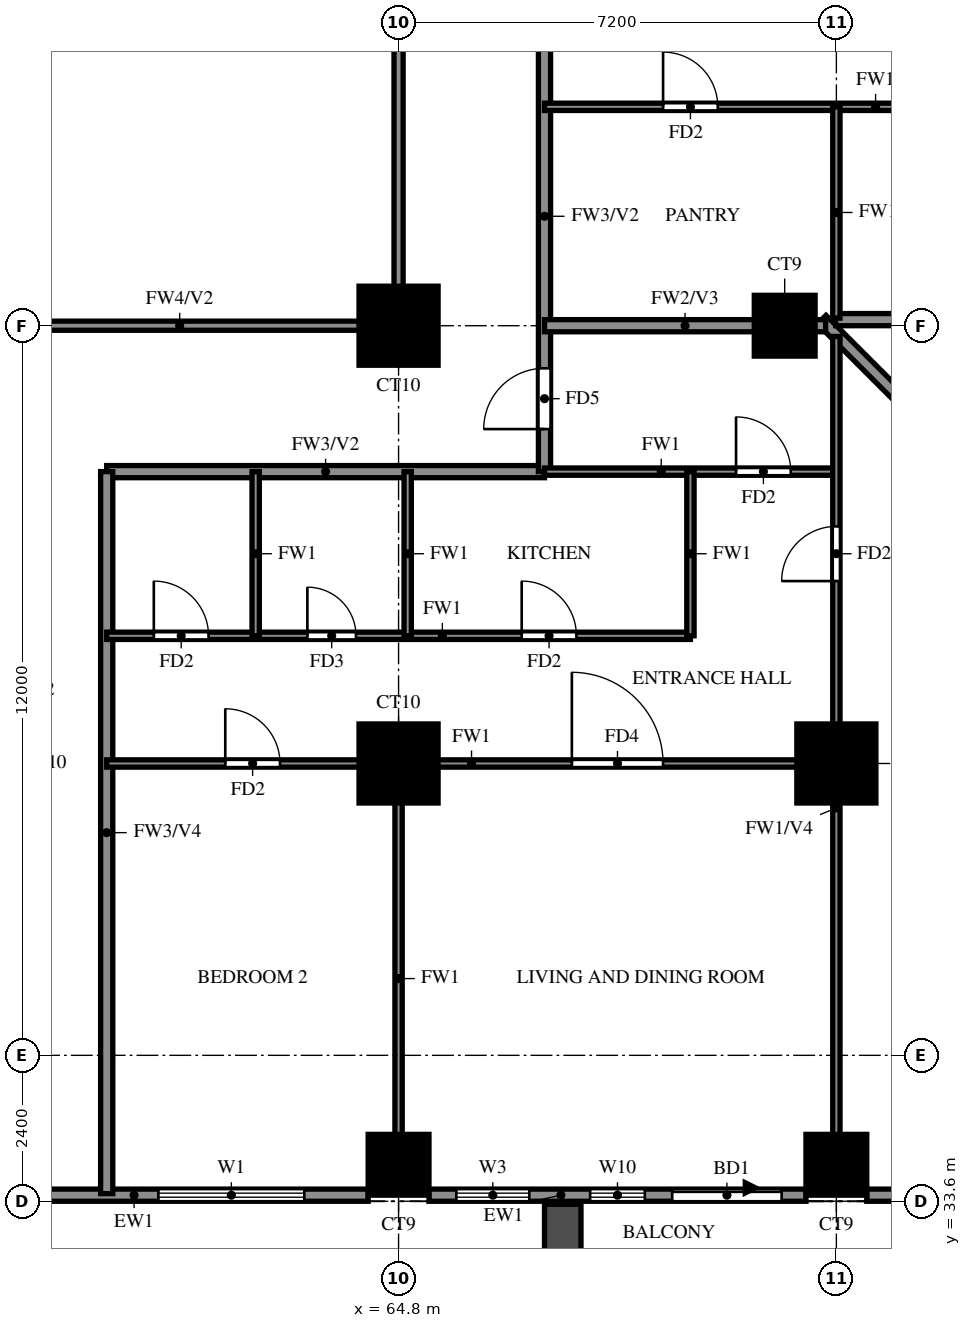
"""IFC4 building model, lengths in metres.
Left out: names, types, materials, properties, quantities, classifications, styles, units other than length and angle.
Written with IfcOpenShell. Run it as: python <this file> out.ifc"""

import sys

from ifc_helpers import new_model, si_unit, direction, frame, frame_2d, origin, origin_2d, place, context, subcontext, project, spatial, rectangle, extrude, source, transform, mapped, element, fill, save


model = new_model("IFC4")
c1 = context("Model", 3, precision=1e-05, world=origin(), true_north=direction((0.0, 1.0)))
c2 = subcontext(c1, "Body", "Model", "MODEL_VIEW")
j1 = project(units=[si_unit("LENGTHUNIT", "METRE"), si_unit("PLANEANGLEUNIT", "RADIAN")], contexts=[c1])
p1 = place(None, origin())
s1 = spatial("IfcSite", under=j1, at=p1, CompositionType="ELEMENT")
p2 = place(p1, origin())
s2 = spatial("IfcBuilding", under=s1, at=p2, CompositionType="ELEMENT")
p3 = place(p2, frame((0.0, 0.0, 90.0)))
s3 = spatial("IfcBuildingStorey", under=s2, at=p3, CompositionType="ELEMENT", Elevation=90.0)
m1 = source(origin(), c2, "Body", "SweptSolid", [
    extrude(rectangle(XDim=1.0, YDim=1.0, at=origin_2d()), origin(), (0.0, 0.0, 1.0), 3.18),
])
for number, where, z_axis, x_axis in (
    (1, (64.8, 34.2, 0.0), (0.0, 0.0, 1.0), (1.0, 0.0, 0.0)),
    (2, (72.0, 34.2, 0.0), (0.0, 0.0, 1.0), (1.0, 0.0, 0.0)),
):
    element("IfcColumn", number, at=place(p3, frame(where, z_axis=z_axis, x_axis=x_axis)), inside=s3, PredefinedType="COLUMN", context=c2, shape_type="MappedRepresentation", body=[
        mapped(m1, transform((0.0, 0.0, 0.0))),
    ])
m2 = source(origin(), c2, "Body", "SweptSolid", [
    extrude(rectangle(XDim=1.3, YDim=1.3, at=origin_2d()), origin(), (0.0, 0.0, 1.0), 3.18),
])
for number, where, z_axis, x_axis in (
    (3, (64.8, 40.8, 0.0), (0.0, 0.0, 1.0), (1.0, 0.0, 0.0)),
    (4, (72.0, 40.8, 0.0), (0.0, 0.0, 1.0), (1.0, 0.0, 0.0)),
    (5, (64.8, 48.0, 0.0), (0.0, 0.0, 1.0), (1.0, 0.0, 0.0)),
):
    element("IfcColumn", number, at=place(p3, frame(where, z_axis=z_axis, x_axis=x_axis)), inside=s3, PredefinedType="COLUMN", context=c2, shape_type="MappedRepresentation", body=[
        mapped(m2, transform((0.0, 0.0, 0.0))),
    ])
p4 = place(p3, frame((71.15, 48.0, 0.0), z_axis=(0.0, 0.0, 1.0), x_axis=(1.0, 0.0, 0.0)))
e6 = element("IfcColumn", 6, at=p4, inside=s3, PredefinedType="COLUMN", context=c2, shape_type="MappedRepresentation", body=[
    mapped(m1, transform((0.0, 0.0, 0.0))),
])
p5 = place(p3, frame((85.996, 33.863, 0.0), z_axis=(0.0, 0.0, 1.0), x_axis=(-0.707100718496, 0.707112843825, 0.0)))
e7 = element("IfcWall", 7, at=p5, inside=s3, PredefinedType="SOLIDWALL", context=c2, shape_type="SweptSolid", body=[
    extrude(rectangle(XDim=20.135, YDim=0.2, at=frame_2d((10.067, 0.0))), origin(), (0.0, 0.0, 1.0), 3.18),
])
p6 = place(p3, frame((71.989, 48.1, 0.0), z_axis=(0.0, 0.0, 1.0), x_axis=(1.0, 0.0, 0.0)))
e8 = element("IfcWall", 8, at=p6, inside=s3, PredefinedType="SOLIDWALL", context=c2, shape_type="SweptSolid", body=[
    extrude(rectangle(XDim=6.562, YDim=0.2, at=frame_2d((3.281, 0.0))), origin(), (0.0, 0.0, 1.0), 3.18),
])
p7 = place(p6, frame((2.206, 0.0, 1.5)))
e9 = element("IfcOpeningElement", 9, at=p7, cuts=e8, PredefinedType="OPENING", context=c2, shape_type="SweptSolid", body=[
    extrude(rectangle(XDim=0.9, YDim=0.9, at=frame_2d((0.45, 0.45))), frame((0.0, 0.11, 0.0), z_axis=(0.0, -1.0, 0.0), x_axis=(1.0, 0.0, 0.0)), (0.0, 0.0, 1.0), 0.22),
])
p8 = place(p3, frame((58.8, 33.7, 0.0), z_axis=(0.0, 0.0, 1.0), x_axis=(1.0, 0.0, 0.0)))
e10 = element("IfcWall", 10, at=p8, inside=s3, PredefinedType="SOLIDWALL", context=c2, shape_type="SweptSolid", body=[
    extrude(rectangle(XDim=5.5, YDim=0.2, at=frame_2d((2.75, 0.0))), origin(), (0.0, 0.0, 1.0), 3.18),
])
p9 = place(p8, frame((2.05, 0.0, 0.6)))
e11 = element("IfcOpeningElement", 11, at=p9, cuts=e10, PredefinedType="OPENING", context=c2, shape_type="SweptSolid", body=[
    extrude(rectangle(XDim=2.4, YDim=2.4, at=frame_2d((1.2, 1.2))), frame((0.0, 0.11, 0.0), z_axis=(0.0, -1.0, 0.0), x_axis=(1.0, 0.0, 0.0)), (0.0, 0.0, 1.0), 0.22),
])
p10 = place(p3, frame((65.3, 33.7, 0.0), z_axis=(0.0, 0.0, 1.0), x_axis=(1.0, 0.0, 0.0)))
e12 = element("IfcWall", 12, at=p10, inside=s3, PredefinedType="SOLIDWALL", context=c2, shape_type="SweptSolid", body=[
    extrude(rectangle(XDim=6.2, YDim=0.2, at=frame_2d((3.1, 0.0))), origin(), (0.0, 0.0, 1.0), 3.18),
])
p11 = place(p10, frame((4.0, 0.0, 0.0)))
e13 = element("IfcOpeningElement", 13, at=p11, cuts=e12, PredefinedType="OPENING", context=c2, shape_type="SweptSolid", body=[
    extrude(rectangle(XDim=1.8, YDim=2.4, at=frame_2d((0.9, 1.2))), frame((0.0, 0.11, 0.0), z_axis=(0.0, -1.0, 0.0), x_axis=(1.0, 0.0, 0.0)), (0.0, 0.0, 1.0), 0.22),
])
p12 = place(p10, frame((0.45, 0.0, 0.6)))
e14 = element("IfcOpeningElement", 14, at=p12, cuts=e12, PredefinedType="OPENING", context=c2, shape_type="SweptSolid", body=[
    extrude(rectangle(XDim=1.2, YDim=2.4, at=frame_2d((0.6, 1.2))), frame((0.0, 0.11, 0.0), z_axis=(0.0, -1.0, 0.0), x_axis=(1.0, 0.0, 0.0)), (0.0, 0.0, 1.0), 0.22),
])
p13 = place(p10, frame((2.65, 0.0, 0.6)))
e15 = element("IfcOpeningElement", 15, at=p13, cuts=e12, PredefinedType="OPENING", context=c2, shape_type="SweptSolid", body=[
    extrude(rectangle(XDim=0.9, YDim=2.4, at=frame_2d((0.45, 1.2))), frame((0.0, 0.11, 0.0), z_axis=(0.0, -1.0, 0.0), x_axis=(1.0, 0.0, 0.0)), (0.0, 0.0, 1.0), 0.22),
])
p14 = place(p3, frame((72.5, 33.7, 0.0), z_axis=(0.0, 0.0, 1.0), x_axis=(1.0, 0.0, 0.0)))
e16 = element("IfcWall", 16, at=p14, inside=s3, PredefinedType="SOLIDWALL", context=c2, shape_type="SweptSolid", body=[
    extrude(rectangle(XDim=13.659, YDim=0.2, at=frame_2d((6.829, 0.0))), origin(), (0.0, 0.0, 1.0), 3.18),
])
p15 = place(p14, frame((3.1, 0.0, 0.6)))
e17 = element("IfcOpeningElement", 17, at=p15, cuts=e16, PredefinedType="OPENING", context=c2, shape_type="SweptSolid", body=[
    extrude(rectangle(XDim=2.4, YDim=2.4, at=frame_2d((1.2, 1.2))), frame((0.0, 0.11, 0.0), z_axis=(0.0, -1.0, 0.0), x_axis=(1.0, 0.0, 0.0)), (0.0, 0.0, 1.0), 0.22),
])
p16 = place(p14, frame((7.386, 0.0, 0.6)))
e18 = element("IfcOpeningElement", 18, at=p16, cuts=e16, PredefinedType="OPENING", context=c2, shape_type="SweptSolid", body=[
    extrude(rectangle(XDim=2.4, YDim=2.4, at=frame_2d((1.2, 1.2))), frame((0.0, 0.11, 0.0), z_axis=(0.0, -1.0, 0.0), x_axis=(1.0, 0.0, 0.0)), (0.0, 0.0, 1.0), 0.22),
])
p17 = place(p14, frame((10.372, 0.0, 0.6)))
e19 = element("IfcOpeningElement", 19, at=p17, cuts=e16, PredefinedType="OPENING", context=c2, shape_type="SweptSolid", body=[
    extrude(rectangle(XDim=2.4, YDim=2.4, at=frame_2d((1.2, 1.2))), frame((0.0, 0.11, 0.0), z_axis=(0.0, -1.0, 0.0), x_axis=(1.0, 0.0, 0.0)), (0.0, 0.0, 1.0), 0.22),
])
p18 = place(p3, frame((67.5, 33.55, 0.0), z_axis=(0.0, 0.0, 1.0), x_axis=(0.0, -1.0, 0.0)))
e20 = element("IfcWall", 20, at=p18, inside=s3, PredefinedType="SOLIDWALL", context=c2, shape_type="SweptSolid", body=[
    extrude(rectangle(XDim=2.65, YDim=0.6, at=frame_2d((1.325, 0.0))), origin(), (0.0, 0.0, 1.0), 2.85),
])
p19 = place(p3, frame((60.0, 45.6, 0.0), z_axis=(0.0, 0.0, 1.0), x_axis=(1.0, 0.0, 0.0)))
e21 = element("IfcWall", 21, at=p19, inside=s3, PredefinedType="SOLIDWALL", context=c2, shape_type="SweptSolid", body=[
    extrude(rectangle(XDim=7.2, YDim=0.2, at=frame_2d((3.6, 0.0))), origin(), (0.0, 0.0, 1.0), 3.18),
])
p20 = place(p3, frame((60.0, 33.725, 0.0), z_axis=(0.0, 0.0, 1.0), x_axis=(0.0, 1.0, 0.0)))
e22 = element("IfcWall", 22, at=p20, inside=s3, PredefinedType="SOLIDWALL", context=c2, shape_type="SweptSolid", body=[
    extrude(rectangle(XDim=11.875, YDim=0.2, at=frame_2d((5.938, 0.0))), origin(), (0.0, 0.0, 1.0), 2.28),
])
p21 = place(p3, frame((67.2, 45.6, 0.0), z_axis=(0.0, 0.0, 1.0), x_axis=(0.0, 1.0, 0.0)))
e23 = element("IfcWall", 23, at=p21, inside=s3, PredefinedType="SOLIDWALL", context=c2, shape_type="SweptSolid", body=[
    extrude(rectangle(XDim=8.4, YDim=0.2, at=frame_2d((4.2, 0.0))), origin(), (0.0, 0.0, 1.0), 3.18),
])
p22 = place(p21, frame((0.7, 0.0, 0.0)))
e24 = element("IfcOpeningElement", 24, at=p22, cuts=e23, PredefinedType="OPENING", context=c2, shape_type="SweptSolid", body=[
    extrude(rectangle(XDim=1.0, YDim=2.1, at=frame_2d((0.5, 1.05))), frame((0.0, 0.11, 0.0), z_axis=(0.0, -1.0, 0.0), x_axis=(1.0, 0.0, 0.0)), (0.0, 0.0, 1.0), 0.22),
])
p23 = place(p3, frame((67.2, 48.0, 0.0), z_axis=(0.0, 0.0, 1.0), x_axis=(1.0, 0.0, 0.0)))
e25 = element("IfcWall", 25, at=p23, inside=s3, PredefinedType="SOLIDWALL", context=c2, shape_type="SweptSolid", body=[
    extrude(rectangle(XDim=4.623, YDim=0.2, at=frame_2d((2.312, 0.0))), origin(), (0.0, 0.0, 1.0), 3.18),
])
p24 = place(p3, frame((60.0, 40.8, 0.0), z_axis=(0.0, 0.0, 1.0), x_axis=(1.0, 0.0, 0.0)))
e26 = element("IfcWall", 26, at=p24, inside=s3, PredefinedType="PARTITIONING", context=c2, shape_type="SweptSolid", body=[
    extrude(rectangle(XDim=12.0, YDim=0.12, at=frame_2d((6.0, 0.0))), origin(), (0.0, 0.0, 1.0), 3.18),
])
p25 = place(p24, frame((7.65, 0.0, 0.0)))
e27 = element("IfcOpeningElement", 27, at=p25, cuts=e26, PredefinedType="OPENING", context=c2, shape_type="SweptSolid", body=[
    extrude(rectangle(XDim=1.5, YDim=2.1, at=frame_2d((0.75, 1.05))), frame((0.0, 0.07, 0.0), z_axis=(0.0, -1.0, 0.0), x_axis=(1.0, 0.0, 0.0)), (0.0, 0.0, 1.0), 0.14),
])
p26 = place(p24, frame((1.95, 0.0, 0.0)))
e28 = element("IfcOpeningElement", 28, at=p26, cuts=e26, PredefinedType="OPENING", context=c2, shape_type="SweptSolid", body=[
    extrude(rectangle(XDim=0.9, YDim=2.1, at=frame_2d((0.45, 1.05))), frame((0.0, 0.07, 0.0), z_axis=(0.0, -1.0, 0.0), x_axis=(1.0, 0.0, 0.0)), (0.0, 0.0, 1.0), 0.14),
])
p27 = place(p3, frame((60.0, 42.9, 0.0), z_axis=(0.0, 0.0, 1.0), x_axis=(1.0, 0.0, 0.0)))
e29 = element("IfcWall", 29, at=p27, inside=s3, PredefinedType="PARTITIONING", context=c2, shape_type="SweptSolid", body=[
    extrude(rectangle(XDim=9.6, YDim=0.12, at=frame_2d((4.8, 0.0))), origin(), (0.0, 0.0, 1.0), 3.18),
])
p28 = place(p27, frame((6.825, 0.0, 0.0)))
e30 = element("IfcOpeningElement", 30, at=p28, cuts=e29, PredefinedType="OPENING", context=c2, shape_type="SweptSolid", body=[
    extrude(rectangle(XDim=0.9, YDim=2.1, at=frame_2d((0.45, 1.05))), frame((0.0, 0.07, 0.0), z_axis=(0.0, -1.0, 0.0), x_axis=(1.0, 0.0, 0.0)), (0.0, 0.0, 1.0), 0.14),
])
p29 = place(p27, frame((3.3, 0.0, 0.0)))
e31 = element("IfcOpeningElement", 31, at=p29, cuts=e29, PredefinedType="OPENING", context=c2, shape_type="SweptSolid", body=[
    extrude(rectangle(XDim=0.8, YDim=2.1, at=frame_2d((0.4, 1.05))), frame((0.0, 0.07, 0.0), z_axis=(0.0, -1.0, 0.0), x_axis=(1.0, 0.0, 0.0)), (0.0, 0.0, 1.0), 0.14),
])
p30 = place(p27, frame((0.775, 0.0, 0.0)))
e32 = element("IfcOpeningElement", 32, at=p30, cuts=e29, PredefinedType="OPENING", context=c2, shape_type="SweptSolid", body=[
    extrude(rectangle(XDim=0.9, YDim=2.1, at=frame_2d((0.45, 1.05))), frame((0.0, 0.07, 0.0), z_axis=(0.0, -1.0, 0.0), x_axis=(1.0, 0.0, 0.0)), (0.0, 0.0, 1.0), 0.14),
])
p31 = place(p3, frame((67.2, 45.6, 0.0), z_axis=(0.0, 0.0, 1.0), x_axis=(1.0, 0.0, 0.0)))
e33 = element("IfcWall", 33, at=p31, inside=s3, PredefinedType="PARTITIONING", context=c2, shape_type="SweptSolid", body=[
    extrude(rectangle(XDim=4.8, YDim=0.12, at=frame_2d((2.4, 0.0))), origin(), (0.0, 0.0, 1.0), 3.18),
])
p32 = place(p31, frame((3.15, 0.0, 0.0)))
e34 = element("IfcOpeningElement", 34, at=p32, cuts=e33, PredefinedType="OPENING", context=c2, shape_type="SweptSolid", body=[
    extrude(rectangle(XDim=0.9, YDim=2.1, at=frame_2d((0.45, 1.05))), frame((0.0, 0.07, 0.0), z_axis=(0.0, -1.0, 0.0), x_axis=(1.0, 0.0, 0.0)), (0.0, 0.0, 1.0), 0.14),
])
p33 = place(p3, frame((67.2, 51.6, 0.0), z_axis=(0.0, 0.0, 1.0), x_axis=(1.0, 0.0, 0.0)))
e35 = element("IfcWall", 35, at=p33, inside=s3, PredefinedType="PARTITIONING", context=c2, shape_type="SweptSolid", body=[
    extrude(rectangle(XDim=9.9, YDim=0.12, at=frame_2d((4.95, 0.0))), origin(), (0.0, 0.0, 1.0), 3.18),
])
p34 = place(p33, frame((6.95, 0.0, 0.0)))
e36 = element("IfcOpeningElement", 36, at=p34, cuts=e35, PredefinedType="OPENING", context=c2, shape_type="SweptSolid", body=[
    extrude(rectangle(XDim=0.8, YDim=2.1, at=frame_2d((0.4, 1.05))), frame((0.0, 0.07, 0.0), z_axis=(0.0, -1.0, 0.0), x_axis=(1.0, 0.0, 0.0)), (0.0, 0.0, 1.0), 0.14),
])
p35 = place(p33, frame((1.95, 0.0, 0.0)))
e37 = element("IfcOpeningElement", 37, at=p35, cuts=e35, PredefinedType="OPENING", context=c2, shape_type="SweptSolid", body=[
    extrude(rectangle(XDim=0.9, YDim=2.1, at=frame_2d((0.45, 1.05))), frame((0.0, 0.07, 0.0), z_axis=(0.0, -1.0, 0.0), x_axis=(1.0, 0.0, 0.0)), (0.0, 0.0, 1.0), 0.14),
])
p36 = place(p3, frame((62.45, 42.9, 0.0), z_axis=(0.0, 0.0, 1.0), x_axis=(0.0, 1.0, 0.0)))
e38 = element("IfcWall", 38, at=p36, inside=s3, PredefinedType="PARTITIONING", context=c2, shape_type="SweptSolid", body=[
    extrude(rectangle(XDim=2.7, YDim=0.12, at=frame_2d((1.35, 0.0))), origin(), (0.0, 0.0, 1.0), 3.18),
])
p37 = place(p3, frame((64.8, 33.725, 0.0), z_axis=(0.0, 0.0, 1.0), x_axis=(0.0, 1.0, 0.0)))
e39 = element("IfcWall", 39, at=p37, inside=s3, PredefinedType="PARTITIONING", context=c2, shape_type="SweptSolid", body=[
    extrude(rectangle(XDim=7.075, YDim=0.12, at=frame_2d((3.538, 0.0))), origin(), (0.0, 0.0, 1.0), 3.18),
])
for number, where, z_axis, x_axis in (
    (40, (64.95, 42.9, 0.0), (0.0, 0.0, 1.0), (0.0, 1.0, 0.0)),
    (41, (69.6, 42.9, 0.0), (0.0, 0.0, 1.0), (0.0, 1.0, 0.0)),
):
    element("IfcWall", number, at=place(p3, frame(where, z_axis=z_axis, x_axis=x_axis)), inside=s3, PredefinedType="PARTITIONING", context=c2, shape_type="SweptSolid", body=[
        extrude(rectangle(XDim=2.7, YDim=0.12, at=frame_2d((1.35, 0.0))), origin(), (0.0, 0.0, 1.0), 3.18),
    ])
p38 = place(p3, frame((72.0, 33.725, 0.0), z_axis=(0.0, 0.0, 1.0), x_axis=(0.0, 1.0, 0.0)))
e42 = element("IfcWall", 42, at=p38, inside=s3, PredefinedType="PARTITIONING", context=c2, shape_type="SweptSolid", body=[
    extrude(rectangle(XDim=14.098, YDim=0.12, at=frame_2d((7.049, 0.0))), origin(), (0.0, 0.0, 1.0), 2.28),
])
p39 = place(p38, frame((10.075, 0.0, 0.0)))
e43 = element("IfcOpeningElement", 43, at=p39, cuts=e42, PredefinedType="OPENING", context=c2, shape_type="SweptSolid", body=[
    extrude(rectangle(XDim=0.9, YDim=2.1, at=frame_2d((0.45, 1.05))), frame((0.0, 0.07, 0.0), z_axis=(0.0, -1.0, 0.0), x_axis=(1.0, 0.0, 0.0)), (0.0, 0.0, 1.0), 0.14),
])
p40 = place(p3, frame((72.0, 48.125, 0.0), z_axis=(0.0, 0.0, 1.0), x_axis=(0.0, 1.0, 0.0)))
e44 = element("IfcWall", 44, at=p40, inside=s3, PredefinedType="PARTITIONING", context=c2, shape_type="SweptSolid", body=[
    extrude(rectangle(XDim=3.475, YDim=0.12, at=frame_2d((1.738, 0.0))), origin(), (0.0, 0.0, 1.0), 3.18),
])
p41 = place(p3, frame((57.6, 48.0, 0.0), z_axis=(0.0, 0.0, 1.0), x_axis=(1.0, 0.0, 0.0)))
e45 = element("IfcWall", 45, at=p41, inside=s3, PredefinedType="SOLIDWALL", context=c2, shape_type="SweptSolid", body=[
    extrude(rectangle(XDim=7.2, YDim=0.15, at=frame_2d((3.6, 0.0))), origin(), (0.0, 0.0, 1.0), 2.28),
])
p42 = place(p3, frame((64.8, 48.0, 0.0), z_axis=(0.0, 0.0, 1.0), x_axis=(0.0, 1.0, 0.0)))
e46 = element("IfcWall", 46, at=p42, inside=s3, PredefinedType="SOLIDWALL", context=c2, shape_type="SweptSolid", body=[
    extrude(rectangle(XDim=14.4, YDim=0.15, at=frame_2d((7.2, 0.0))), origin(), (0.0, 0.0, 1.0), 2.28),
])
p43 = place(p9, origin())
e47 = element("IfcWindow", 47, at=p43, inside=s3, PartitioningType="DOUBLE_PANEL_VERTICAL", PredefinedType="WINDOW", context=c2, shape_type="SweptSolid", body=[
    extrude(rectangle(XDim=2.4, YDim=2.4, at=frame_2d((1.2, 1.2))), frame((0.0, 0.03, 0.0), z_axis=(0.0, -1.0, 0.0), x_axis=(1.0, 0.0, 0.0)), (0.0, 0.0, 1.0), 0.06),
])
fill(e11, e47)
p44 = place(p11, origin())
e48 = element("IfcDoor", 48, at=p44, inside=s3, OperationType="DOUBLE_DOOR_SLIDING", PredefinedType="DOOR", context=c2, shape_type="SweptSolid", body=[
    extrude(rectangle(XDim=1.8, YDim=2.4, at=frame_2d((0.9, 1.2))), frame((0.0, 0.025, 0.0), z_axis=(0.0, -1.0, 0.0), x_axis=(1.0, 0.0, 0.0)), (0.0, 0.0, 1.0), 0.05),
])
fill(e13, e48)
p45 = place(p12, origin())
e49 = element("IfcWindow", 49, at=p45, inside=s3, PartitioningType="SINGLE_PANEL", PredefinedType="WINDOW", context=c2, shape_type="SweptSolid", body=[
    extrude(rectangle(XDim=1.2, YDim=2.4, at=frame_2d((0.6, 1.2))), frame((0.0, 0.03, 0.0), z_axis=(0.0, -1.0, 0.0), x_axis=(1.0, 0.0, 0.0)), (0.0, 0.0, 1.0), 0.06),
])
fill(e14, e49)
p46 = place(p13, origin())
e50 = element("IfcWindow", 50, at=p46, inside=s3, PartitioningType="SINGLE_PANEL", PredefinedType="WINDOW", context=c2, shape_type="SweptSolid", body=[
    extrude(rectangle(XDim=0.9, YDim=2.4, at=frame_2d((0.45, 1.2))), frame((0.0, 0.03, 0.0), z_axis=(0.0, -1.0, 0.0), x_axis=(1.0, 0.0, 0.0)), (0.0, 0.0, 1.0), 0.06),
])
fill(e15, e50)
p47 = place(p35, origin())
e51 = element("IfcDoor", 51, at=p47, inside=s3, OperationType="SINGLE_SWING_RIGHT", PredefinedType="DOOR", context=c2, shape_type="SweptSolid", body=[
    extrude(rectangle(XDim=0.9, YDim=2.1, at=frame_2d((0.45, 1.05))), frame((0.0, 0.025, 0.0), z_axis=(0.0, -1.0, 0.0), x_axis=(1.0, 0.0, 0.0)), (0.0, 0.0, 1.0), 0.05),
])
fill(e37, e51)
p48 = place(p32, origin())
e52 = element("IfcDoor", 52, at=p48, inside=s3, OperationType="SINGLE_SWING_LEFT", PredefinedType="DOOR", context=c2, shape_type="SweptSolid", body=[
    extrude(rectangle(XDim=0.9, YDim=2.1, at=frame_2d((0.45, 1.05))), frame((0.0, 0.025, 0.0), z_axis=(0.0, -1.0, 0.0), x_axis=(1.0, 0.0, 0.0)), (0.0, 0.0, 1.0), 0.05),
])
fill(e34, e52)
p49 = place(p22, origin())
e53 = element("IfcDoor", 53, at=p49, inside=s3, OperationType="SINGLE_SWING_LEFT", PredefinedType="DOOR", context=c2, shape_type="SweptSolid", body=[
    extrude(rectangle(XDim=1.0, YDim=2.1, at=frame_2d((0.5, 1.05))), frame((0.0, 0.025, 0.0), z_axis=(0.0, -1.0, 0.0), x_axis=(1.0, 0.0, 0.0)), (0.0, 0.0, 1.0), 0.05),
])
fill(e24, e53)
p50 = place(p25, origin())
e54 = element("IfcDoor", 54, at=p50, inside=s3, OperationType="SINGLE_SWING_RIGHT", PredefinedType="DOOR", context=c2, shape_type="SweptSolid", body=[
    extrude(rectangle(XDim=1.5, YDim=2.1, at=frame_2d((0.75, 1.05))), frame((0.0, 0.025, 0.0), z_axis=(0.0, -1.0, 0.0), x_axis=(1.0, 0.0, 0.0)), (0.0, 0.0, 1.0), 0.05),
])
fill(e27, e54)
p51 = place(p26, origin())
e55 = element("IfcDoor", 55, at=p51, inside=s3, OperationType="SINGLE_SWING_LEFT", PredefinedType="DOOR", context=c2, shape_type="SweptSolid", body=[
    extrude(rectangle(XDim=0.9, YDim=2.1, at=frame_2d((0.45, 1.05))), frame((0.0, 0.025, 0.0), z_axis=(0.0, -1.0, 0.0), x_axis=(1.0, 0.0, 0.0)), (0.0, 0.0, 1.0), 0.05),
])
fill(e28, e55)
p52 = place(p28, origin())
e56 = element("IfcDoor", 56, at=p52, inside=s3, OperationType="SINGLE_SWING_LEFT", PredefinedType="DOOR", context=c2, shape_type="SweptSolid", body=[
    extrude(rectangle(XDim=0.9, YDim=2.1, at=frame_2d((0.45, 1.05))), frame((0.0, 0.025, 0.0), z_axis=(0.0, -1.0, 0.0), x_axis=(1.0, 0.0, 0.0)), (0.0, 0.0, 1.0), 0.05),
])
fill(e30, e56)
p53 = place(p29, origin())
e57 = element("IfcDoor", 57, at=p53, inside=s3, OperationType="SINGLE_SWING_RIGHT", PredefinedType="DOOR", context=c2, shape_type="SweptSolid", body=[
    extrude(rectangle(XDim=0.8, YDim=2.1, at=frame_2d((0.4, 1.05))), frame((0.0, 0.025, 0.0), z_axis=(0.0, -1.0, 0.0), x_axis=(1.0, 0.0, 0.0)), (0.0, 0.0, 1.0), 0.05),
])
fill(e31, e57)
p54 = place(p30, origin())
e58 = element("IfcDoor", 58, at=p54, inside=s3, OperationType="SINGLE_SWING_LEFT", PredefinedType="DOOR", context=c2, shape_type="SweptSolid", body=[
    extrude(rectangle(XDim=0.9, YDim=2.1, at=frame_2d((0.45, 1.05))), frame((0.0, 0.025, 0.0), z_axis=(0.0, -1.0, 0.0), x_axis=(1.0, 0.0, 0.0)), (0.0, 0.0, 1.0), 0.05),
])
fill(e32, e58)
p55 = place(p39, origin())
e59 = element("IfcDoor", 59, at=p55, inside=s3, OperationType="SINGLE_SWING_LEFT", PredefinedType="DOOR", context=c2, shape_type="SweptSolid", body=[
    extrude(rectangle(XDim=0.9, YDim=2.1, at=frame_2d((0.45, 1.05))), frame((0.0, 0.025, 0.0), z_axis=(0.0, -1.0, 0.0), x_axis=(1.0, 0.0, 0.0)), (0.0, 0.0, 1.0), 0.05),
])
fill(e43, e59)
save(model, sys.argv[1])
